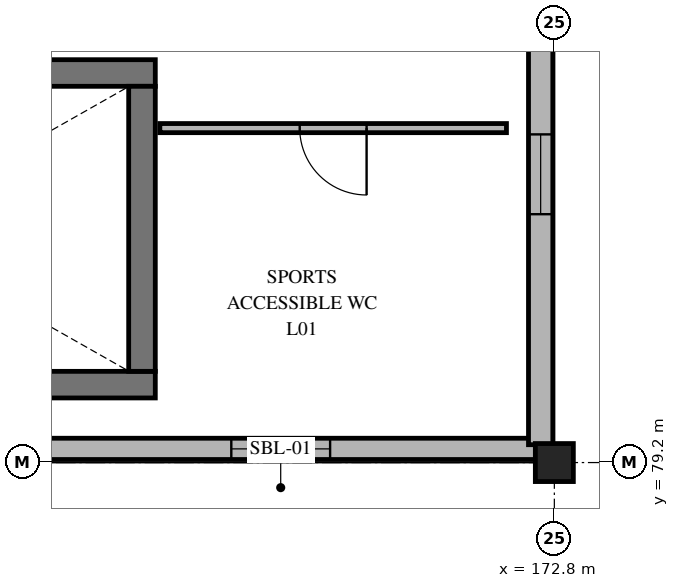
"""IFC4 building model, lengths in metres.
Left out: names, types, materials, properties, quantities, classifications, styles, units other than length and angle.
Written with IfcOpenShell. Run it as: python <this file> out.ifc"""

import sys

from ifc_helpers import new_model, si_unit, direction, frame, frame_2d, origin, origin_2d, place, context, subcontext, project, spatial, rectangle, extrude, element, fill, save


model = new_model("IFC4")
c1 = context("Model", 3, precision=1e-05, world=origin(), true_north=direction((0.0, 1.0)))
c2 = subcontext(c1, "Body", "Model", "MODEL_VIEW")
j1 = project(units=[si_unit("LENGTHUNIT", "METRE"), si_unit("PLANEANGLEUNIT", "RADIAN")], contexts=[c1])
p1 = place(None, origin())
s1 = spatial("IfcSite", under=j1, at=p1, CompositionType="ELEMENT")
p2 = place(p1, origin())
s2 = spatial("IfcBuilding", under=s1, at=p2, CompositionType="ELEMENT")
p3 = place(p2, frame((0.0, 0.0, 4.5)))
s3 = spatial("IfcBuildingStorey", under=s2, at=p3, CompositionType="ELEMENT", Elevation=4.5)
p4 = place(p3, frame((172.8, 79.2, 0.0), z_axis=(0.0, 0.0, 1.0), x_axis=(1.0, 0.0, 0.0)))
e1 = element("IfcColumn", 1, at=p4, inside=s3, PredefinedType="COLUMN", context=c2, shape_type="SweptSolid", body=[
    extrude(rectangle(XDim=0.5, YDim=0.5, at=origin_2d()), origin(), (0.0, 0.0, 1.0), 4.2),
])
p5 = place(p3, frame((172.565, 79.38, 0.0), z_axis=(0.0, 0.0, 1.0), x_axis=(-1.0, 0.0, 0.0)))
e2 = element("IfcWall", 2, at=p5, inside=s3, PredefinedType="SOLIDWALL", context=c2, shape_type="SweptSolid", body=[
    extrude(rectangle(XDim=6.73, YDim=0.28, at=frame_2d((3.365, 0.0))), origin(), (0.0, 0.0, 1.0), 3.5),
])
p6 = place(p5, frame((2.715, 0.0, 0.75)))
e3 = element("IfcOpeningElement", 3, at=p6, cuts=e2, PredefinedType="OPENING", context=c2, shape_type="SweptSolid", body=[
    extrude(rectangle(XDim=1.3, YDim=1.45, at=frame_2d((0.65, 0.725))), frame((0.0, 0.15, 0.0), z_axis=(0.0, -1.0, 0.0), x_axis=(1.0, 0.0, 0.0)), (0.0, 0.0, 1.0), 0.3),
])
p7 = place(p3, frame((172.62, 86.55, 0.0), z_axis=(0.0, 0.0, 1.0), x_axis=(0.0, -1.0, 0.0)))
e4 = element("IfcWall", 4, at=p7, inside=s3, PredefinedType="SOLIDWALL", context=c2, shape_type="SweptSolid", body=[
    extrude(rectangle(XDim=7.115, YDim=0.32, at=frame_2d((3.558, 0.0))), origin(), (0.0, 0.0, 1.0), 3.95),
])
p8 = place(p7, frame((3.032, 0.0, 0.9)))
e5 = element("IfcOpeningElement", 5, at=p8, cuts=e4, PredefinedType="OPENING", context=c2, shape_type="SweptSolid", body=[
    extrude(rectangle(XDim=1.05, YDim=1.2, at=frame_2d((0.525, 0.6))), frame((0.0, 0.17, 0.0), z_axis=(0.0, -1.0, 0.0), x_axis=(1.0, 0.0, 0.0)), (0.0, 0.0, 1.0), 0.34),
])
for number, where, z_axis, x_axis in (
    (6, (158.45, 80.225, 0.0), (0.0, 0.0, 1.0), (1.0, 0.0, 0.0)),
    (7, (167.55, 84.325, 0.0), (0.0, 0.0, 1.0), (-1.0, 0.0, 0.0)),
):
    element("IfcWall", number, at=place(p3, frame(where, z_axis=z_axis, x_axis=x_axis)), inside=s3, PredefinedType="SHEAR", context=c2, shape_type="SweptSolid", body=[
        extrude(rectangle(XDim=9.1, YDim=0.35, at=frame_2d((4.55, 0.0))), origin(), (0.0, 0.0, 1.0), 3.95),
    ])
p9 = place(p3, frame((167.375, 80.4, 0.0), z_axis=(0.0, 0.0, 1.0), x_axis=(0.0, 1.0, 0.0)))
e8 = element("IfcWall", 8, at=p9, inside=s3, PredefinedType="SHEAR", context=c2, shape_type="SweptSolid", body=[
    extrude(rectangle(XDim=3.75, YDim=0.35, at=frame_2d((1.875, 0.0))), origin(), (0.0, 0.0, 1.0), 3.95),
])
p10 = place(p3, frame((172.17, 83.6, 0.0), z_axis=(0.0, 0.0, 1.0), x_axis=(-1.0, 0.0, 0.0)))
e9 = element("IfcWall", 9, at=p10, inside=s3, PredefinedType="PARTITIONING", context=c2, shape_type="SweptSolid", body=[
    extrude(rectangle(XDim=4.56, YDim=0.12, at=frame_2d((2.28, 0.0))), origin(), (0.0, 0.0, 1.0), 3.95),
])
p11 = place(p10, frame((1.84, 0.0, 0.0)))
e10 = element("IfcOpeningElement", 10, at=p11, cuts=e9, PredefinedType="OPENING", context=c2, shape_type="SweptSolid", body=[
    extrude(rectangle(XDim=0.88, YDim=2.1, at=frame_2d((0.44, 1.05))), frame((0.0, 0.07, 0.0), z_axis=(0.0, -1.0, 0.0), x_axis=(1.0, 0.0, 0.0)), (0.0, 0.0, 1.0), 0.14),
])
p12 = place(p6, origin())
e11 = element("IfcWindow", 11, at=p12, inside=s3, PartitioningType="SINGLE_PANEL", PredefinedType="WINDOW", context=c2, shape_type="SweptSolid", body=[
    extrude(rectangle(XDim=1.3, YDim=1.45, at=frame_2d((0.65, 0.725))), frame((0.0, 0.03, 0.0), z_axis=(0.0, -1.0, 0.0), x_axis=(1.0, 0.0, 0.0)), (0.0, 0.0, 1.0), 0.06),
])
fill(e3, e11)
p13 = place(p8, origin())
e12 = element("IfcWindow", 12, at=p13, inside=s3, PartitioningType="SINGLE_PANEL", PredefinedType="WINDOW", context=c2, shape_type="SweptSolid", body=[
    extrude(rectangle(XDim=1.05, YDim=1.2, at=frame_2d((0.525, 0.6))), frame((0.0, 0.03, 0.0), z_axis=(0.0, -1.0, 0.0), x_axis=(1.0, 0.0, 0.0)), (0.0, 0.0, 1.0), 0.06),
])
fill(e5, e12)
p14 = place(p11, origin())
e13 = element("IfcDoor", 13, at=p14, inside=s3, OperationType="SINGLE_SWING_LEFT", PredefinedType="DOOR", context=c2, shape_type="SweptSolid", body=[
    extrude(rectangle(XDim=0.88, YDim=2.1, at=frame_2d((0.44, 1.05))), frame((0.0, 0.025, 0.0), z_axis=(0.0, -1.0, 0.0), x_axis=(1.0, 0.0, 0.0)), (0.0, 0.0, 1.0), 0.05),
])
fill(e10, e13)
save(model, sys.argv[1])
